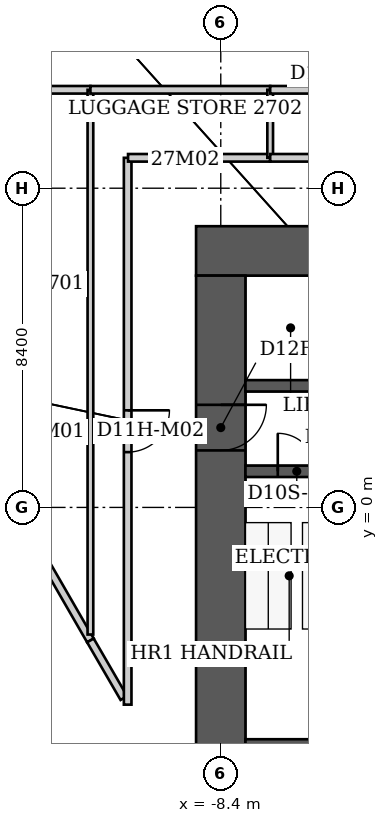
"""IFC4 building model, lengths in metres.
Left out: names, types, materials, properties, quantities, classifications, styles, units other than length and angle.
Written with IfcOpenShell. Run it as: python <this file> out.ifc"""

import sys

from ifc_helpers import new_model, si_unit, direction, frame, frame_2d, origin, place, context, subcontext, project, spatial, rectangle, extrude, element, fill, save


model = new_model("IFC4")
c1 = context("Model", 3, precision=1e-05, world=origin(), true_north=direction((0.0, 1.0)))
c2 = subcontext(c1, "Body", "Model", "MODEL_VIEW")
j1 = project(units=[si_unit("LENGTHUNIT", "METRE"), si_unit("PLANEANGLEUNIT", "RADIAN")], contexts=[c1])
p1 = place(None, origin())
s1 = spatial("IfcSite", under=j1, at=p1, CompositionType="ELEMENT")
p2 = place(p1, origin())
s2 = spatial("IfcBuilding", under=s1, at=p2, CompositionType="ELEMENT")
p3 = place(p2, frame((0.0, 0.0, 112.0)))
s3 = spatial("IfcBuildingStorey", under=s2, at=p3, CompositionType="ELEMENT", Elevation=112.0)
p4 = place(p3, frame((-9.05, 6.75, 0.0), z_axis=(0.0, 0.0, 1.0), x_axis=(1.0, 0.0, 0.0)))
e1 = element("IfcWall", 1, at=p4, inside=s3, PredefinedType="SHEAR", context=c2, shape_type="SweptSolid", body=[
    extrude(rectangle(XDim=18.1, YDim=1.3, at=frame_2d((9.05, 0.0))), origin(), (0.0, 0.0, 1.0), 3.8),
])
p5 = place(p3, frame((-8.4, -9.2, 0.0), z_axis=(0.0, 0.0, 1.0), x_axis=(0.0, 1.0, 0.0)))
e2 = element("IfcWall", 2, at=p5, inside=s3, PredefinedType="SHEAR", context=c2, shape_type="SweptSolid", body=[
    extrude(rectangle(XDim=15.3, YDim=1.3, at=frame_2d((7.65, 0.0))), origin(), (0.0, 0.0, 1.0), 3.8),
])
p6 = place(p5, frame((10.7, 0.0, 0.0)))
e3 = element("IfcOpeningElement", 3, at=p6, cuts=e2, PredefinedType="OPENING", context=c2, shape_type="SweptSolid", body=[
    extrude(rectangle(XDim=1.2, YDim=2.2, at=frame_2d((0.6, 1.1))), frame((0.0, 0.65, 0.0), z_axis=(0.0, -1.0, 0.0), x_axis=(1.0, 0.0, 0.0)), (0.0, 0.0, 1.0), 1.3),
])
p7 = place(p3, frame((-7.75, -6.5, 0.0), z_axis=(0.0, 0.0, 1.0), x_axis=(1.0, 0.0, 0.0)))
e4 = element("IfcWall", 4, at=p7, inside=s3, PredefinedType="SHEAR", context=c2, shape_type="SweptSolid", body=[
    extrude(rectangle(XDim=15.5, YDim=0.8, at=frame_2d((7.75, 0.0))), origin(), (0.0, 0.0, 1.0), 3.8),
])
p8 = place(p3, frame((-7.75, 0.95, 0.0), z_axis=(0.0, 0.0, 1.0), x_axis=(1.0, 0.0, 0.0)))
e5 = element("IfcWall", 5, at=p8, inside=s3, PredefinedType="SHEAR", context=c2, shape_type="SweptSolid", body=[
    extrude(rectangle(XDim=3.0, YDim=0.3, at=frame_2d((1.5, 0.0))), origin(), (0.0, 0.0, 1.0), 3.8),
])
p9 = place(p8, frame((0.85, 0.0, 0.0)))
e6 = element("IfcOpeningElement", 6, at=p9, cuts=e5, PredefinedType="OPENING", context=c2, shape_type="SweptSolid", body=[
    extrude(rectangle(XDim=1.0, YDim=2.2, at=frame_2d((0.5, 1.1))), frame((0.0, 0.15, 0.0), z_axis=(0.0, -1.0, 0.0), x_axis=(1.0, 0.0, 0.0)), (0.0, 0.0, 1.0), 0.3),
])
p10 = place(p3, frame((-7.75, 3.2, 0.0), z_axis=(0.0, 0.0, 1.0), x_axis=(1.0, 0.0, 0.0)))
e7 = element("IfcWall", 7, at=p10, inside=s3, PredefinedType="SHEAR", context=c2, shape_type="SweptSolid", body=[
    extrude(rectangle(XDim=15.5, YDim=0.3, at=frame_2d((7.75, 0.0))), origin(), (0.0, 0.0, 1.0), 3.8),
])
p11 = place(p10, frame((5.688, 0.0, 0.0)))
e8 = element("IfcOpeningElement", 8, at=p11, cuts=e7, PredefinedType="OPENING", context=c2, shape_type="SweptSolid", body=[
    extrude(rectangle(XDim=1.1, YDim=2.2, at=frame_2d((0.55, 1.1))), frame((0.0, 0.15, 0.0), z_axis=(0.0, -1.0, 0.0), x_axis=(1.0, 0.0, 0.0)), (0.0, 0.0, 1.0), 0.3),
])
p12 = place(p10, frame((8.031, 0.0, 0.0)))
e9 = element("IfcOpeningElement", 9, at=p12, cuts=e7, PredefinedType="OPENING", context=c2, shape_type="SweptSolid", body=[
    extrude(rectangle(XDim=1.1, YDim=2.2, at=frame_2d((0.55, 1.1))), frame((0.0, 0.15, 0.0), z_axis=(0.0, -1.0, 0.0), x_axis=(1.0, 0.0, 0.0)), (0.0, 0.0, 1.0), 0.3),
])
p13 = place(p10, frame((10.85, 0.0, 0.0)))
e10 = element("IfcOpeningElement", 10, at=p13, cuts=e7, PredefinedType="OPENING", context=c2, shape_type="SweptSolid", body=[
    extrude(rectangle(XDim=1.1, YDim=2.2, at=frame_2d((0.55, 1.1))), frame((0.0, 0.15, 0.0), z_axis=(0.0, -1.0, 0.0), x_axis=(1.0, 0.0, 0.0)), (0.0, 0.0, 1.0), 0.3),
])
p14 = place(p10, frame((13.706, 0.0, 0.0)))
e11 = element("IfcOpeningElement", 11, at=p14, cuts=e7, PredefinedType="OPENING", context=c2, shape_type="SweptSolid", body=[
    extrude(rectangle(XDim=1.1, YDim=2.2, at=frame_2d((0.55, 1.1))), frame((0.0, 0.15, 0.0), z_axis=(0.0, -1.0, 0.0), x_axis=(1.0, 0.0, 0.0)), (0.0, 0.0, 1.0), 0.3),
])
p15 = place(p3, frame((-12.93, 10.99, 0.0), z_axis=(0.0, 0.0, 1.0), x_axis=(1.0, 0.0, 0.0)))
e12 = element("IfcWall", 12, at=p15, inside=s3, PredefinedType="PARTITIONING", context=c2, shape_type="SweptSolid", body=[
    extrude(rectangle(XDim=1.1, YDim=0.2, at=frame_2d((0.55, 0.0))), origin(), (0.0, 0.0, 1.0), 3.64),
])
p16 = place(p3, frame((-11.83, -3.5, 0.0), z_axis=(0.0, 0.0, 1.0), x_axis=(-0.499662169849, 0.866220362276, 0.0)))
e13 = element("IfcWall", 13, at=p16, inside=s3, PredefinedType="PARTITIONING", context=c2, shape_type="SweptSolid", body=[
    extrude(rectangle(XDim=9.466, YDim=0.2, at=frame_2d((4.733, 0.0))), origin(), (0.0, 0.0, 1.0), 3.64),
])
p17 = place(p16, frame((4.183, 0.0, 0.0)))
e14 = element("IfcOpeningElement", 14, at=p17, cuts=e13, PredefinedType="OPENING", context=c2, shape_type="SweptSolid", body=[
    extrude(rectangle(XDim=1.1, YDim=2.2, at=frame_2d((0.55, 1.1))), frame((0.0, 0.1, 0.0), z_axis=(0.0, -1.0, 0.0), x_axis=(1.0, 0.0, 0.0)), (0.0, 0.0, 1.0), 0.2),
])
p18 = place(p3, frame((-11.83, 10.99, 0.0), z_axis=(0.0, 0.0, 1.0), x_axis=(0.0, -1.0, 0.0)))
e15 = element("IfcWall", 15, at=p18, inside=s3, PredefinedType="PARTITIONING", context=c2, shape_type="SweptSolid", body=[
    extrude(rectangle(XDim=14.335, YDim=0.15, at=frame_2d((7.167, 0.0))), origin(), (0.0, 0.0, 1.0), 3.64),
])
p19 = place(p3, frame((-11.83, 10.99, 0.0), z_axis=(0.0, 0.0, 1.0), x_axis=(1.0, 0.0, 0.0)))
e16 = element("IfcWall", 16, at=p19, inside=s3, PredefinedType="PARTITIONING", context=c2, shape_type="SweptSolid", body=[
    extrude(rectangle(XDim=4.73, YDim=0.2, at=frame_2d((2.365, 0.0))), origin(), (0.0, 0.0, 1.0), 3.64),
])
p20 = place(p3, frame((-10.95, -5.017, 0.0), z_axis=(0.0, 0.0, 1.0), x_axis=(-0.501601410683, 0.865098852618, 0.0)))
e17 = element("IfcWall", 17, at=p20, inside=s3, PredefinedType="PARTITIONING", context=c2, shape_type="SweptSolid", body=[
    extrude(rectangle(XDim=1.754, YDim=0.2, at=frame_2d((0.877, 0.0))), origin(), (0.0, 0.0, 1.0), 3.64),
])
p21 = place(p3, frame((-10.85, 9.2, 0.0), z_axis=(0.0, 0.0, 1.0), x_axis=(0.0, -1.0, 0.0)))
e18 = element("IfcWall", 18, at=p21, inside=s3, PredefinedType="PARTITIONING", context=c2, shape_type="SweptSolid", body=[
    extrude(rectangle(XDim=14.39, YDim=0.2, at=frame_2d((7.195, 0.0))), origin(), (0.0, 0.0, 1.0), 3.64),
])
p22 = place(p21, frame((6.645, 0.0, 0.0)))
e19 = element("IfcOpeningElement", 19, at=p22, cuts=e18, PredefinedType="OPENING", context=c2, shape_type="SweptSolid", body=[
    extrude(rectangle(XDim=1.1, YDim=2.2, at=frame_2d((0.55, 1.1))), frame((0.0, 0.1, 0.0), z_axis=(0.0, -1.0, 0.0), x_axis=(1.0, 0.0, 0.0)), (0.0, 0.0, 1.0), 0.2),
])
p23 = place(p3, frame((-7.1, 9.2, 0.0), z_axis=(0.0, 0.0, 1.0), x_axis=(-1.0, 0.0, 0.0)))
e20 = element("IfcWall", 20, at=p23, inside=s3, PredefinedType="PARTITIONING", context=c2, shape_type="SweptSolid", body=[
    extrude(rectangle(XDim=3.74, YDim=0.2, at=frame_2d((1.87, 0.0))), origin(), (0.0, 0.0, 1.0), 3.64),
])
p24 = place(p3, frame((-7.1, 10.99, 0.0), z_axis=(0.0, 0.0, 1.0), x_axis=(0.0, -1.0, 0.0)))
e21 = element("IfcWall", 21, at=p24, inside=s3, PredefinedType="PARTITIONING", context=c2, shape_type="SweptSolid", body=[
    extrude(rectangle(XDim=1.79, YDim=0.15, at=frame_2d((0.895, 0.0))), origin(), (0.0, 0.0, 1.0), 3.64),
])
p25 = place(p3, frame((-7.1, 10.99, 0.0), z_axis=(0.0, 0.0, 1.0), x_axis=(1.0, 0.0, 0.0)))
e22 = element("IfcWall", 22, at=p25, inside=s3, PredefinedType="PARTITIONING", context=c2, shape_type="SweptSolid", body=[
    extrude(rectangle(XDim=4.73, YDim=0.2, at=frame_2d((2.365, 0.0))), origin(), (0.0, 0.0, 1.0), 3.64),
])
p26 = place(p25, frame((1.815, 0.0, 0.0)))
e23 = element("IfcOpeningElement", 23, at=p26, cuts=e22, PredefinedType="OPENING", context=c2, shape_type="SweptSolid", body=[
    extrude(rectangle(XDim=1.1, YDim=2.2, at=frame_2d((0.55, 1.1))), frame((0.0, 0.1, 0.0), z_axis=(0.0, -1.0, 0.0), x_axis=(1.0, 0.0, 0.0)), (0.0, 0.0, 1.0), 0.2),
])
p27 = place(p3, frame((-2.37, 9.2, 0.0), z_axis=(0.0, 0.0, 1.0), x_axis=(-1.0, 0.0, 0.0)))
e24 = element("IfcWall", 24, at=p27, inside=s3, PredefinedType="PARTITIONING", context=c2, shape_type="SweptSolid", body=[
    extrude(rectangle(XDim=4.73, YDim=0.2, at=frame_2d((2.365, 0.0))), origin(), (0.0, 0.0, 1.0), 3.64),
])
p28 = place(p22, origin())
e25 = element("IfcDoor", 25, at=p28, inside=s3, OperationType="SINGLE_SWING_LEFT", PredefinedType="DOOR", context=c2, shape_type="SweptSolid", body=[
    extrude(rectangle(XDim=1.1, YDim=2.2, at=frame_2d((0.55, 1.1))), frame((0.0, 0.025, 0.0), z_axis=(0.0, -1.0, 0.0), x_axis=(1.0, 0.0, 0.0)), (0.0, 0.0, 1.0), 0.05),
])
fill(e19, e25)
p29 = place(p9, origin())
e26 = element("IfcDoor", 26, at=p29, inside=s3, OperationType="SINGLE_SWING_LEFT", PredefinedType="DOOR", context=c2, shape_type="SweptSolid", body=[
    extrude(rectangle(XDim=1.0, YDim=2.2, at=frame_2d((0.5, 1.1))), frame((0.0, 0.025, 0.0), z_axis=(0.0, -1.0, 0.0), x_axis=(1.0, 0.0, 0.0)), (0.0, 0.0, 1.0), 0.05),
])
fill(e6, e26)
p30 = place(p6, origin())
e27 = element("IfcDoor", 27, at=p30, inside=s3, OperationType="SINGLE_SWING_RIGHT", PredefinedType="DOOR", context=c2, shape_type="SweptSolid", body=[
    extrude(rectangle(XDim=1.2, YDim=2.2, at=frame_2d((0.6, 1.1))), frame((0.0, 0.025, 0.0), z_axis=(0.0, -1.0, 0.0), x_axis=(1.0, 0.0, 0.0)), (0.0, 0.0, 1.0), 0.05),
])
fill(e3, e27)
save(model, sys.argv[1])
